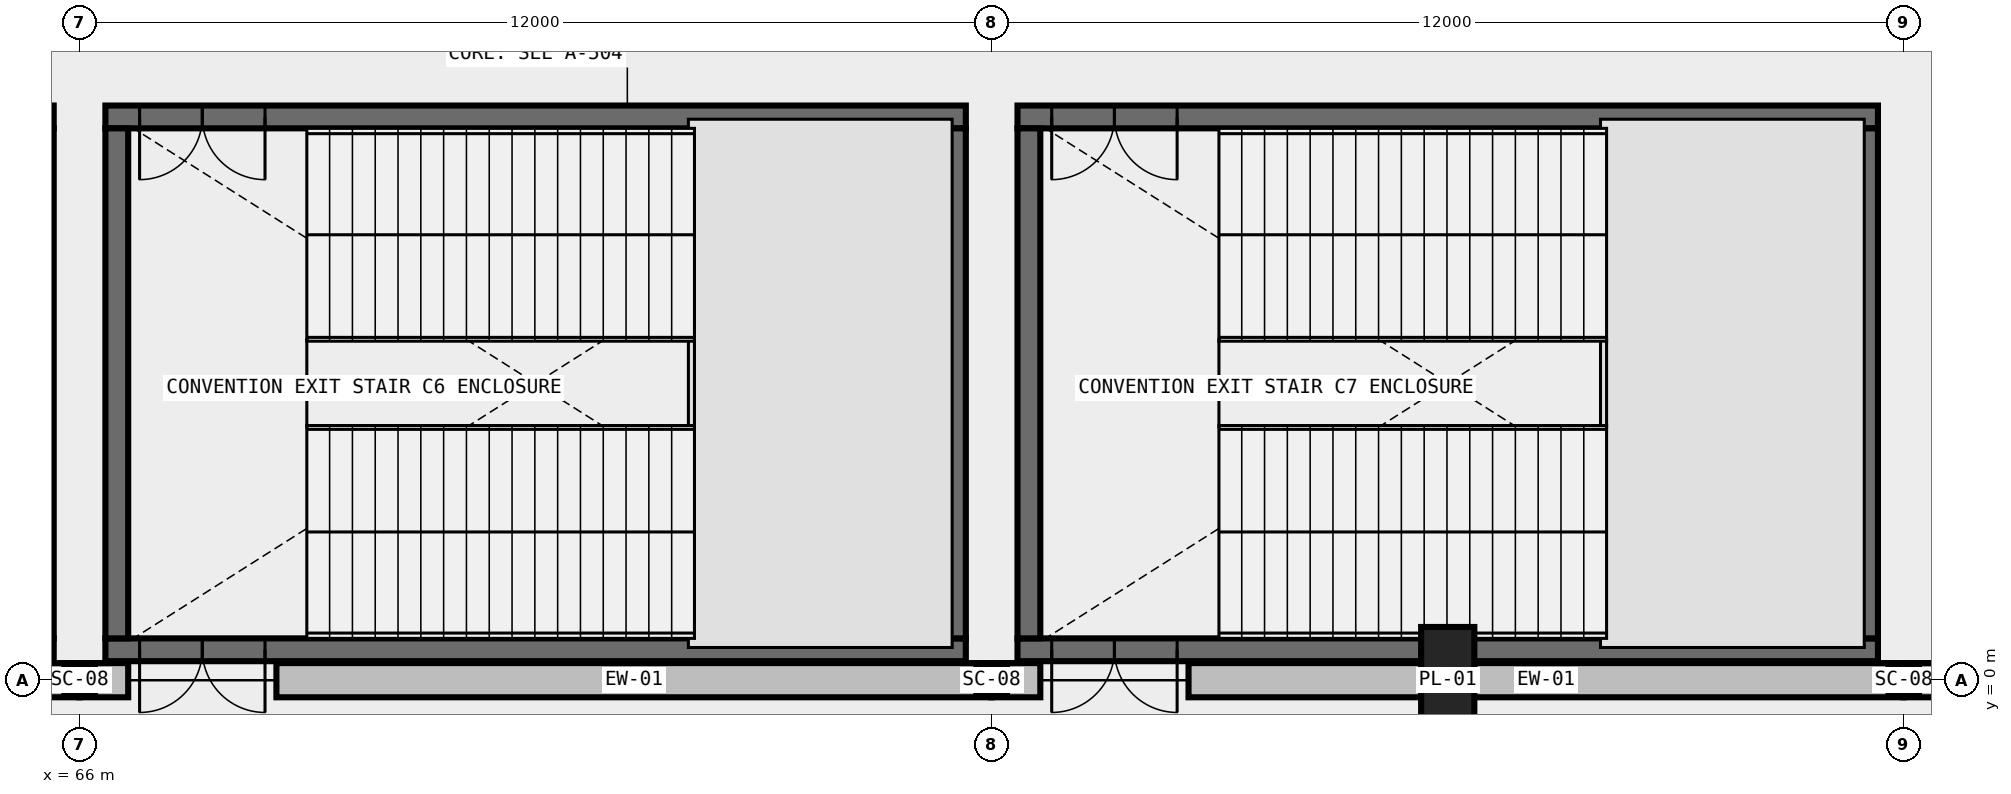
"""IFC4 building model, lengths in metres.
Left out: names, types, materials, properties, quantities, classifications, styles, units other than length and angle.
Written with IfcOpenShell. Run it as: python <this file> out.ifc"""

import sys

from ifc_helpers import new_model, si_unit, direction, frame, frame_2d, origin, origin_2d, place, context, subcontext, project, spatial, rectangle, i_section, extrude, element, fill, save


model = new_model("IFC4")
c1 = context("Model", 3, precision=1e-05, world=origin(), true_north=direction((0.0, 1.0)))
c2 = subcontext(c1, "Body", "Model", "MODEL_VIEW")
j1 = project(units=[si_unit("LENGTHUNIT", "METRE"), si_unit("PLANEANGLEUNIT", "RADIAN")], contexts=[c1])
p1 = place(None, origin())
s1 = spatial("IfcSite", under=j1, at=p1, CompositionType="ELEMENT")
p2 = place(p1, origin())
s2 = spatial("IfcBuilding", under=s1, at=p2, CompositionType="ELEMENT")
p3 = place(p2, origin())
s3 = spatial("IfcBuildingStorey", under=s2, at=p3, CompositionType="ELEMENT", Elevation=0.0)
for number, where, z_axis, x_axis in (
    (1, (66.0, 0.0, 0.0), (0.0, 0.0, 1.0), (1.0, 0.0, 0.0)),
    (2, (78.0, 0.0, 0.0), (0.0, 0.0, 1.0), (1.0, 0.0, 0.0)),
    (3, (90.0, 0.0, 0.0), (0.0, 0.0, 1.0), (1.0, 0.0, 0.0)),
):
    element("IfcColumn", number, at=place(p3, frame(where, z_axis=z_axis, x_axis=x_axis)), inside=s3, PredefinedType="COLUMN", context=c2, shape_type="SweptSolid", body=[
        extrude(i_section(OverallWidth=0.401, OverallDepth=0.399, WebThickness=0.025, FlangeThickness=0.04, FilletRadius=0.031, at=origin_2d()), origin(), (0.0, 0.0, 1.0), 6.0),
    ])
p4 = place(p3, frame((84.0, 0.0, 0.0), z_axis=(0.0, 0.0, 1.0), x_axis=(1.0, 0.0, 0.0)))
e4 = element("IfcColumn", 4, at=p4, inside=s3, PredefinedType="PILASTER", context=c2, shape_type="SweptSolid", body=[
    extrude(rectangle(XDim=0.7, YDim=1.4, at=origin_2d()), origin(), (0.0, 0.0, 1.0), 6.0),
])
p5 = place(p3, frame((65.66, 0.4, 0.0), z_axis=(0.0, 0.0, 1.0), x_axis=(-1.0, 0.0, 0.0)))
e5 = element("IfcWall", 5, at=p5, inside=s3, PredefinedType="SHEAR", context=c2, shape_type="SweptSolid", body=[
    extrude(rectangle(XDim=11.32, YDim=0.3, at=frame_2d((5.66, 0.0))), origin(), (0.0, 0.0, 1.0), 6.0),
])
p6 = place(p5, frame((9.22, 0.0, 0.0)))
e6 = element("IfcOpeningElement", 6, at=p6, cuts=e5, PredefinedType="OPENING", context=c2, shape_type="SweptSolid", body=[
    extrude(rectangle(XDim=1.65, YDim=2.25, at=frame_2d((0.825, 1.125))), frame((0.0, 0.165, 0.0), z_axis=(0.0, -1.0, 0.0), x_axis=(1.0, 0.0, 0.0)), (0.0, 0.0, 1.0), 0.33),
])
p7 = place(p3, frame((65.66, 7.41, 0.0), z_axis=(0.0, 0.0, 1.0), x_axis=(-1.0, 0.0, 0.0)))
e7 = element("IfcWall", 7, at=p7, inside=s3, PredefinedType="SHEAR", context=c2, shape_type="SweptSolid", body=[
    extrude(rectangle(XDim=11.32, YDim=0.3, at=frame_2d((5.66, 0.0))), origin(), (0.0, 0.0, 1.0), 6.0),
])
p8 = place(p7, frame((9.22, 0.0, 0.0)))
e8 = element("IfcOpeningElement", 8, at=p8, cuts=e7, PredefinedType="OPENING", context=c2, shape_type="SweptSolid", body=[
    extrude(rectangle(XDim=1.65, YDim=2.25, at=frame_2d((0.825, 1.125))), frame((0.0, 0.165, 0.0), z_axis=(0.0, -1.0, 0.0), x_axis=(1.0, 0.0, 0.0)), (0.0, 0.0, 1.0), 0.33),
])
p9 = place(p3, frame((65.51, 0.55, 0.0), z_axis=(0.0, 0.0, 1.0), x_axis=(0.0, 1.0, 0.0)))
e9 = element("IfcWall", 9, at=p9, inside=s3, PredefinedType="SHEAR", context=c2, shape_type="SweptSolid", body=[
    extrude(rectangle(XDim=6.71, YDim=0.3, at=frame_2d((3.355, 0.0))), origin(), (0.0, 0.0, 1.0), 6.0),
])
p10 = place(p3, frame((77.66, 0.4, 0.0), z_axis=(0.0, 0.0, 1.0), x_axis=(-1.0, 0.0, 0.0)))
e10 = element("IfcWall", 10, at=p10, inside=s3, PredefinedType="SHEAR", context=c2, shape_type="SweptSolid", body=[
    extrude(rectangle(XDim=11.32, YDim=0.3, at=frame_2d((5.66, 0.0))), origin(), (0.0, 0.0, 1.0), 6.0),
])
p11 = place(p10, frame((9.22, 0.0, 0.0)))
e11 = element("IfcOpeningElement", 11, at=p11, cuts=e10, PredefinedType="OPENING", context=c2, shape_type="SweptSolid", body=[
    extrude(rectangle(XDim=1.65, YDim=2.25, at=frame_2d((0.825, 1.125))), frame((0.0, 0.165, 0.0), z_axis=(0.0, -1.0, 0.0), x_axis=(1.0, 0.0, 0.0)), (0.0, 0.0, 1.0), 0.33),
])
p12 = place(p3, frame((77.66, 7.41, 0.0), z_axis=(0.0, 0.0, 1.0), x_axis=(-1.0, 0.0, 0.0)))
e12 = element("IfcWall", 12, at=p12, inside=s3, PredefinedType="SHEAR", context=c2, shape_type="SweptSolid", body=[
    extrude(rectangle(XDim=11.32, YDim=0.3, at=frame_2d((5.66, 0.0))), origin(), (0.0, 0.0, 1.0), 6.0),
])
p13 = place(p12, frame((9.22, 0.0, 0.0)))
e13 = element("IfcOpeningElement", 13, at=p13, cuts=e12, PredefinedType="OPENING", context=c2, shape_type="SweptSolid", body=[
    extrude(rectangle(XDim=1.65, YDim=2.25, at=frame_2d((0.825, 1.125))), frame((0.0, 0.165, 0.0), z_axis=(0.0, -1.0, 0.0), x_axis=(1.0, 0.0, 0.0)), (0.0, 0.0, 1.0), 0.33),
])
for number, where, z_axis, x_axis in (
    (14, (66.49, 7.26, 0.0), (0.0, 0.0, 1.0), (0.0, -1.0, 0.0)),
    (15, (77.51, 0.55, 0.0), (0.0, 0.0, 1.0), (0.0, 1.0, 0.0)),
):
    element("IfcWall", number, at=place(p3, frame(where, z_axis=z_axis, x_axis=x_axis)), inside=s3, PredefinedType="SHEAR", context=c2, shape_type="SweptSolid", body=[
        extrude(rectangle(XDim=6.71, YDim=0.3, at=frame_2d((3.355, 0.0))), origin(), (0.0, 0.0, 1.0), 6.0),
    ])
p14 = place(p3, frame((89.66, 0.4, 0.0), z_axis=(0.0, 0.0, 1.0), x_axis=(-1.0, 0.0, 0.0)))
e16 = element("IfcWall", 16, at=p14, inside=s3, PredefinedType="SHEAR", context=c2, shape_type="SweptSolid", body=[
    extrude(rectangle(XDim=11.32, YDim=0.3, at=frame_2d((5.66, 0.0))), origin(), (0.0, 0.0, 1.0), 6.0),
])
p15 = place(p14, frame((9.22, 0.0, 0.0)))
e17 = element("IfcOpeningElement", 17, at=p15, cuts=e16, PredefinedType="OPENING", context=c2, shape_type="SweptSolid", body=[
    extrude(rectangle(XDim=1.65, YDim=2.25, at=frame_2d((0.825, 1.125))), frame((0.0, 0.165, 0.0), z_axis=(0.0, -1.0, 0.0), x_axis=(1.0, 0.0, 0.0)), (0.0, 0.0, 1.0), 0.33),
])
p16 = place(p3, frame((89.66, 7.41, 0.0), z_axis=(0.0, 0.0, 1.0), x_axis=(-1.0, 0.0, 0.0)))
e18 = element("IfcWall", 18, at=p16, inside=s3, PredefinedType="SHEAR", context=c2, shape_type="SweptSolid", body=[
    extrude(rectangle(XDim=11.32, YDim=0.3, at=frame_2d((5.66, 0.0))), origin(), (0.0, 0.0, 1.0), 6.0),
])
p17 = place(p16, frame((9.22, 0.0, 0.0)))
e19 = element("IfcOpeningElement", 19, at=p17, cuts=e18, PredefinedType="OPENING", context=c2, shape_type="SweptSolid", body=[
    extrude(rectangle(XDim=1.65, YDim=2.25, at=frame_2d((0.825, 1.125))), frame((0.0, 0.165, 0.0), z_axis=(0.0, -1.0, 0.0), x_axis=(1.0, 0.0, 0.0)), (0.0, 0.0, 1.0), 0.33),
])
for number, where, z_axis, x_axis in (
    (20, (78.49, 7.26, 0.0), (0.0, 0.0, 1.0), (0.0, -1.0, 0.0)),
    (21, (89.51, 0.55, 0.0), (0.0, 0.0, 1.0), (0.0, 1.0, 0.0)),
):
    element("IfcWall", number, at=place(p3, frame(where, z_axis=z_axis, x_axis=x_axis)), inside=s3, PredefinedType="SHEAR", context=c2, shape_type="SweptSolid", body=[
        extrude(rectangle(XDim=6.71, YDim=0.3, at=frame_2d((3.355, 0.0))), origin(), (0.0, 0.0, 1.0), 6.0),
    ])
p18 = place(p3, frame((56.59, 0.0, 0.0), z_axis=(0.0, 0.0, 1.0), x_axis=(1.0, 0.0, 0.0)))
e22 = element("IfcWall", 22, at=p18, inside=s3, PredefinedType="STANDARD", context=c2, shape_type="SweptSolid", body=[
    extrude(rectangle(XDim=9.41, YDim=0.45, at=frame_2d((4.705, 0.0))), origin(), (0.0, 0.0, 1.0), 4.676),
])
p19 = place(p3, frame((66.0, 0.0, 0.0), z_axis=(0.0, 0.0, 1.0), x_axis=(1.0, 0.0, 0.0)))
e23 = element("IfcWall", 23, at=p19, inside=s3, PredefinedType="STANDARD", context=c2, shape_type="SweptSolid", body=[
    extrude(rectangle(XDim=0.64, YDim=0.45, at=frame_2d((0.32, 0.0))), origin(), (0.0, 0.0, 1.0), 4.676),
])
p20 = place(p3, frame((68.59, 0.0, 0.0), z_axis=(0.0, 0.0, 1.0), x_axis=(1.0, 0.0, 0.0)))
e24 = element("IfcWall", 24, at=p20, inside=s3, PredefinedType="STANDARD", context=c2, shape_type="SweptSolid", body=[
    extrude(rectangle(XDim=9.41, YDim=0.45, at=frame_2d((4.705, 0.0))), origin(), (0.0, 0.0, 1.0), 4.676),
])
p21 = place(p3, frame((78.0, 0.0, 0.0), z_axis=(0.0, 0.0, 1.0), x_axis=(1.0, 0.0, 0.0)))
e25 = element("IfcWall", 25, at=p21, inside=s3, PredefinedType="STANDARD", context=c2, shape_type="SweptSolid", body=[
    extrude(rectangle(XDim=0.64, YDim=0.45, at=frame_2d((0.32, 0.0))), origin(), (0.0, 0.0, 1.0), 4.676),
])
p22 = place(p3, frame((80.59, 0.0, 0.0), z_axis=(0.0, 0.0, 1.0), x_axis=(1.0, 0.0, 0.0)))
e26 = element("IfcWall", 26, at=p22, inside=s3, PredefinedType="STANDARD", context=c2, shape_type="SweptSolid", body=[
    extrude(rectangle(XDim=9.41, YDim=0.45, at=frame_2d((4.705, 0.0))), origin(), (0.0, 0.0, 1.0), 4.676),
])
p23 = place(p3, frame((90.0, 0.0, 0.0), z_axis=(0.0, 0.0, 1.0), x_axis=(1.0, 0.0, 0.0)))
e27 = element("IfcWall", 27, at=p23, inside=s3, PredefinedType="STANDARD", context=c2, shape_type="SweptSolid", body=[
    extrude(rectangle(XDim=6.0, YDim=0.45, at=frame_2d((3.0, 0.0))), origin(), (0.0, 0.0, 1.0), 4.676),
])
p24 = place(p23, frame((1.6, 0.0, 0.0)))
e28 = element("IfcOpeningElement", 28, at=p24, cuts=e27, PredefinedType="OPENING", context=c2, shape_type="SweptSolid", body=[
    extrude(rectangle(XDim=2.2, YDim=2.4, at=frame_2d((1.1, 1.2))), frame((0.0, 0.24, 0.0), z_axis=(0.0, -1.0, 0.0), x_axis=(1.0, 0.0, 0.0)), (0.0, 0.0, 1.0), 0.48),
])
p25 = place(p13, origin())
e29 = element("IfcDoor", 29, at=p25, inside=s3, OperationType="DOUBLE_DOOR_SINGLE_SWING", PredefinedType="DOOR", context=c2, shape_type="SweptSolid", body=[
    extrude(rectangle(XDim=1.65, YDim=2.25, at=frame_2d((0.825, 1.125))), frame((0.0, 0.025, 0.0), z_axis=(0.0, -1.0, 0.0), x_axis=(1.0, 0.0, 0.0)), (0.0, 0.0, 1.0), 0.05),
])
fill(e13, e29)
p26 = place(p11, origin())
e30 = element("IfcDoor", 30, at=p26, inside=s3, OperationType="DOUBLE_DOOR_SINGLE_SWING", PredefinedType="DOOR", context=c2, shape_type="SweptSolid", body=[
    extrude(rectangle(XDim=1.65, YDim=2.25, at=frame_2d((0.825, 1.125))), frame((0.0, 0.025, 0.0), z_axis=(0.0, -1.0, 0.0), x_axis=(1.0, 0.0, 0.0)), (0.0, 0.0, 1.0), 0.05),
])
fill(e11, e30)
p27 = place(p17, origin())
e31 = element("IfcDoor", 31, at=p27, inside=s3, OperationType="DOUBLE_DOOR_SINGLE_SWING", PredefinedType="DOOR", context=c2, shape_type="SweptSolid", body=[
    extrude(rectangle(XDim=1.65, YDim=2.25, at=frame_2d((0.825, 1.125))), frame((0.0, 0.025, 0.0), z_axis=(0.0, -1.0, 0.0), x_axis=(1.0, 0.0, 0.0)), (0.0, 0.0, 1.0), 0.05),
])
fill(e19, e31)
p28 = place(p15, origin())
e32 = element("IfcDoor", 32, at=p28, inside=s3, OperationType="DOUBLE_DOOR_SINGLE_SWING", PredefinedType="DOOR", context=c2, shape_type="SweptSolid", body=[
    extrude(rectangle(XDim=1.65, YDim=2.25, at=frame_2d((0.825, 1.125))), frame((0.0, 0.025, 0.0), z_axis=(0.0, -1.0, 0.0), x_axis=(1.0, 0.0, 0.0)), (0.0, 0.0, 1.0), 0.05),
])
fill(e17, e32)
save(model, sys.argv[1])
